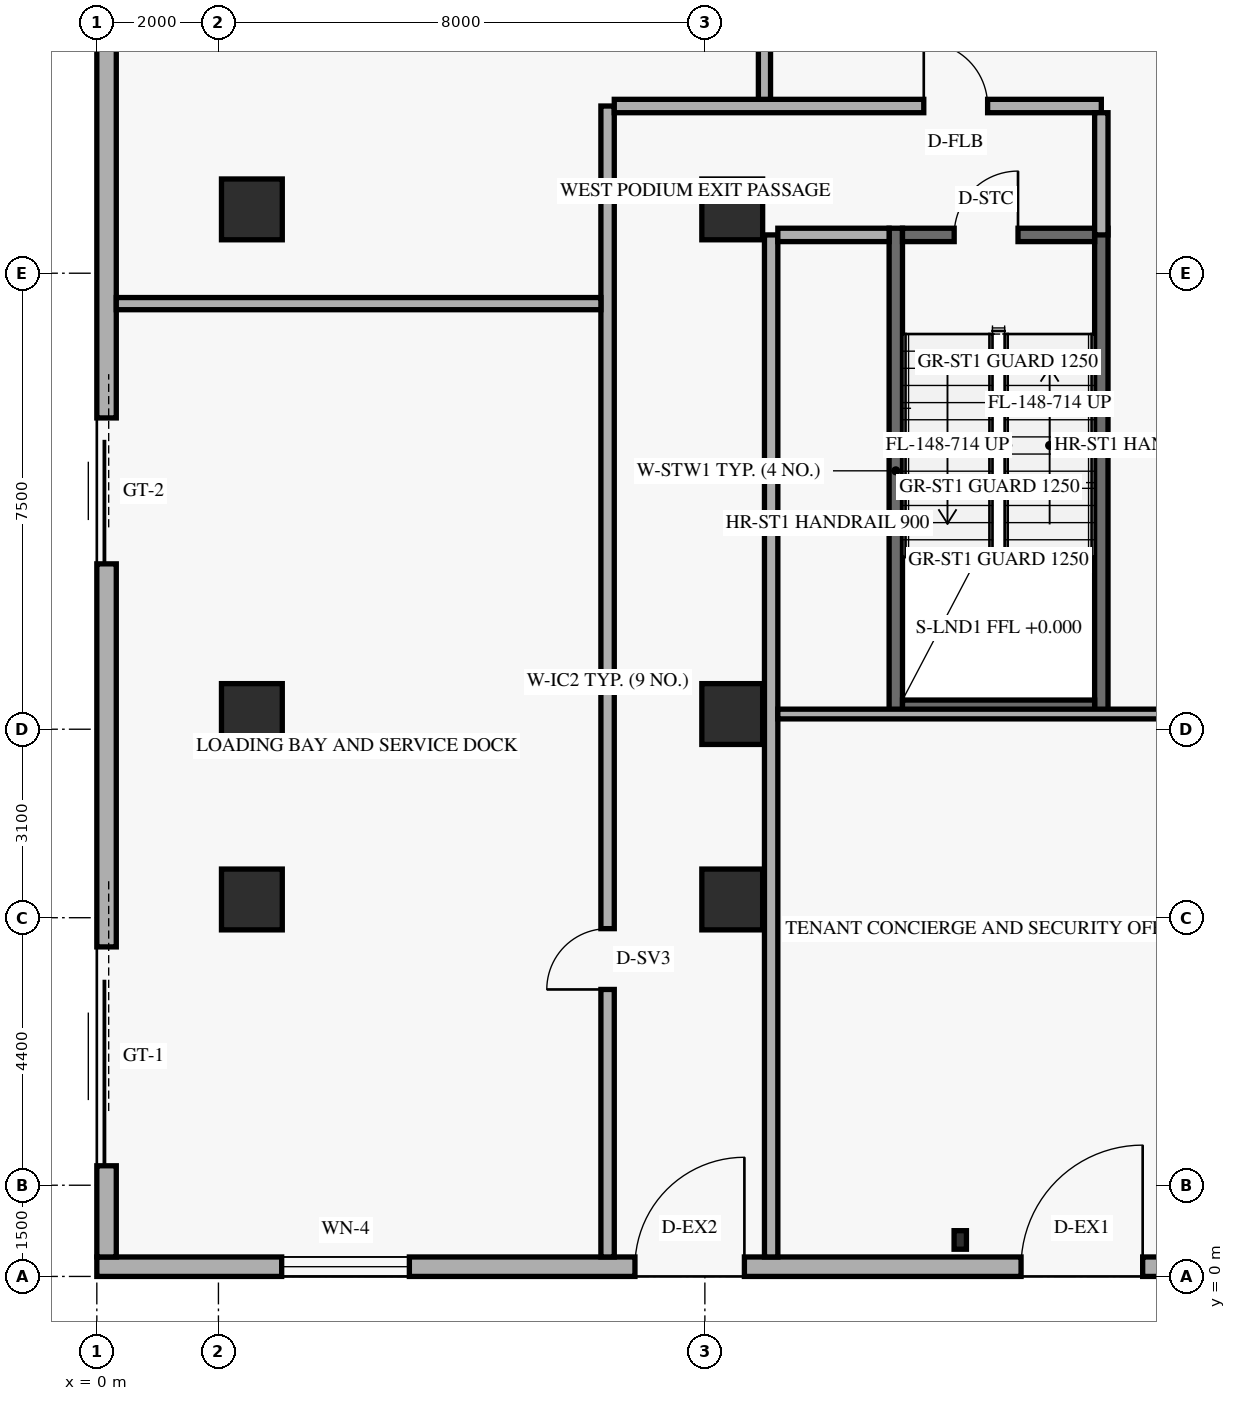
"""IFC4 building model, lengths in metres.
Left out: names, types, materials, properties, quantities, classifications, styles, units other than length and angle.
Written with IfcOpenShell. Run it as: python <this file> out.ifc"""

import sys

from ifc_helpers import new_model, si_unit, direction, frame, frame_2d, origin, origin_2d, place, context, subcontext, project, spatial, rectangle, hollow_rectangle, extrude, element, fill, save


model = new_model("IFC4")
c1 = context("Model", 3, precision=1e-05, world=origin(), true_north=direction((0.0, 1.0)))
c2 = subcontext(c1, "Body", "Model", "MODEL_VIEW")
j1 = project(units=[si_unit("LENGTHUNIT", "METRE"), si_unit("PLANEANGLEUNIT", "RADIAN")], contexts=[c1])
p1 = place(None, origin())
s1 = spatial("IfcSite", under=j1, at=p1, CompositionType="ELEMENT")
p2 = place(p1, origin())
s2 = spatial("IfcBuilding", under=s1, at=p2, CompositionType="ELEMENT")
p3 = place(p2, origin())
s3 = spatial("IfcBuildingStorey", under=s2, at=p3, CompositionType="ELEMENT", Elevation=0.0)
for number, where, z_axis, x_axis in (
    (1, (13.14, 9.26, 0.0), (0.0, 0.0, 1.0), (0.0, 1.0, 0.0)),
    (2, (16.52, 9.26, 0.0), (0.0, 0.0, 1.0), (0.0, 1.0, 0.0)),
):
    element("IfcWall", number, at=place(p3, frame(where, z_axis=z_axis, x_axis=x_axis)), inside=s3, PredefinedType="SHEAR", context=c2, shape_type="SweptSolid", body=[
        extrude(rectangle(XDim=7.98, YDim=0.22, at=frame_2d((3.99, 0.0))), origin(), (0.0, 0.0, 1.0), 4.39),
    ])
p4 = place(p3, frame((13.25, 9.37, 0.0), z_axis=(0.0, 0.0, 1.0), x_axis=(1.0, 0.0, 0.0)))
e3 = element("IfcWall", 3, at=p4, inside=s3, PredefinedType="SHEAR", context=c2, shape_type="SweptSolid", body=[
    extrude(rectangle(XDim=3.16, YDim=0.22, at=frame_2d((1.58, 0.0))), origin(), (0.0, 0.0, 1.0), 4.39),
])
p5 = place(p3, frame((13.25, 17.13, 0.0), z_axis=(0.0, 0.0, 1.0), x_axis=(1.0, 0.0, 0.0)))
e4 = element("IfcWall", 4, at=p5, inside=s3, PredefinedType="SHEAR", context=c2, shape_type="SweptSolid", body=[
    extrude(rectangle(XDim=3.16, YDim=0.22, at=frame_2d((1.58, 0.0))), origin(), (0.0, 0.0, 1.0), 4.39),
])
p6 = place(p5, frame((0.85, 0.0, 0.0)))
e5 = element("IfcOpeningElement", 5, at=p6, cuts=e4, PredefinedType="OPENING", context=c2, shape_type="SweptSolid", body=[
    extrude(rectangle(XDim=1.05, YDim=2.15, at=frame_2d((0.525, 1.075))), frame((0.0, 0.12, 0.0), z_axis=(0.0, -1.0, 0.0), x_axis=(1.0, 0.0, 0.0)), (0.0, 0.0, 1.0), 0.24),
])
for number, where, z_axis, x_axis in (
    (6, (2.55, 6.2, 0.0), (0.0, 0.0, 1.0), (1.0, 0.0, 0.0)),
    (7, (2.55, 9.25, 0.0), (0.0, 0.0, 1.0), (1.0, 0.0, 0.0)),
    (8, (2.55, 17.55, 0.0), (0.0, 0.0, 1.0), (1.0, 0.0, 0.0)),
    (9, (10.45, 6.2, 0.0), (0.0, 0.0, 1.0), (1.0, 0.0, 0.0)),
    (10, (10.45, 9.25, 0.0), (0.0, 0.0, 1.0), (1.0, 0.0, 0.0)),
    (11, (10.45, 17.55, 0.0), (0.0, 0.0, 1.0), (1.0, 0.0, 0.0)),
):
    element("IfcColumn", number, at=place(p3, frame(where, z_axis=z_axis, x_axis=x_axis)), inside=s3, PredefinedType="COLUMN", context=c2, shape_type="SweptSolid", body=[
        extrude(rectangle(XDim=1.0, YDim=1.0, at=origin_2d()), origin(), (0.0, 0.0, 1.0), 4.8),
    ])
p7 = place(p3, frame((14.2, 0.6, 0.0), z_axis=(0.0, 0.0, 1.0), x_axis=(1.0, 0.0, 0.0)))
e12 = element("IfcColumn", 12, at=p7, inside=s3, PredefinedType="PILASTER", context=c2, shape_type="SweptSolid", body=[
    extrude(hollow_rectangle(XDim=0.203, YDim=0.305, WallThickness=0.013, at=origin_2d()), origin(), (0.0, 0.0, 1.0), 4.39),
])
p8 = place(p3, frame((0.0, 0.16, 0.0), z_axis=(0.0, 0.0, 1.0), x_axis=(1.0, 0.0, 0.0)))
e13 = element("IfcWall", 13, at=p8, inside=s3, PredefinedType="SOLIDWALL", context=c2, shape_type="SweptSolid", body=[
    extrude(rectangle(XDim=56.0, YDim=0.32, at=frame_2d((28.0, 0.0))), origin(), (0.0, 0.0, 1.0), 4.39),
])
p9 = place(p8, frame((8.85, 0.0, 0.0)))
e14 = element("IfcOpeningElement", 14, at=p9, cuts=e13, PredefinedType="OPENING", context=c2, shape_type="SweptSolid", body=[
    extrude(rectangle(XDim=1.8, YDim=2.25, at=frame_2d((0.9, 1.125))), frame((0.0, 0.17, 0.0), z_axis=(0.0, -1.0, 0.0), x_axis=(1.0, 0.0, 0.0)), (0.0, 0.0, 1.0), 0.34),
])
p10 = place(p8, frame((15.2, 0.0, 0.0)))
e15 = element("IfcOpeningElement", 15, at=p10, cuts=e13, PredefinedType="OPENING", context=c2, shape_type="SweptSolid", body=[
    extrude(rectangle(XDim=2.0, YDim=2.35, at=frame_2d((1.0, 1.175))), frame((0.0, 0.17, 0.0), z_axis=(0.0, -1.0, 0.0), x_axis=(1.0, 0.0, 0.0)), (0.0, 0.0, 1.0), 0.34),
])
p11 = place(p8, frame((29.6, 0.0, 0.0)))
e16 = element("IfcOpeningElement", 16, at=p11, cuts=e13, PredefinedType="OPENING", context=c2, shape_type="SweptSolid", body=[
    extrude(rectangle(XDim=1.8, YDim=2.25, at=frame_2d((0.9, 1.125))), frame((0.0, 0.17, 0.0), z_axis=(0.0, -1.0, 0.0), x_axis=(1.0, 0.0, 0.0)), (0.0, 0.0, 1.0), 0.34),
])
p12 = place(p8, frame((3.04, 0.0, 0.85)))
e17 = element("IfcOpeningElement", 17, at=p12, cuts=e13, PredefinedType="OPENING", context=c2, shape_type="SweptSolid", body=[
    extrude(rectangle(XDim=2.1, YDim=1.75, at=frame_2d((1.05, 0.875))), frame((0.0, 0.17, 0.0), z_axis=(0.0, -1.0, 0.0), x_axis=(1.0, 0.0, 0.0)), (0.0, 0.0, 1.0), 0.34),
])
p13 = place(p8, frame((18.56, 0.0, 0.85)))
e18 = element("IfcOpeningElement", 18, at=p13, cuts=e13, PredefinedType="OPENING", context=c2, shape_type="SweptSolid", body=[
    extrude(rectangle(XDim=2.1, YDim=1.75, at=frame_2d((1.05, 0.875))), frame((0.0, 0.17, 0.0), z_axis=(0.0, -1.0, 0.0), x_axis=(1.0, 0.0, 0.0)), (0.0, 0.0, 1.0), 0.34),
])
p14 = place(p8, frame((23.745, 0.0, 0.85)))
e19 = element("IfcOpeningElement", 19, at=p14, cuts=e13, PredefinedType="OPENING", context=c2, shape_type="SweptSolid", body=[
    extrude(rectangle(XDim=2.1, YDim=1.75, at=frame_2d((1.05, 0.875))), frame((0.0, 0.17, 0.0), z_axis=(0.0, -1.0, 0.0), x_axis=(1.0, 0.0, 0.0)), (0.0, 0.0, 1.0), 0.34),
])
p15 = place(p8, frame((37.275, 0.0, 0.85)))
e20 = element("IfcOpeningElement", 20, at=p15, cuts=e13, PredefinedType="OPENING", context=c2, shape_type="SweptSolid", body=[
    extrude(rectangle(XDim=2.1, YDim=1.75, at=frame_2d((1.05, 0.875))), frame((0.0, 0.17, 0.0), z_axis=(0.0, -1.0, 0.0), x_axis=(1.0, 0.0, 0.0)), (0.0, 0.0, 1.0), 0.34),
])
p16 = place(p8, frame((48.95, 0.0, 0.85)))
e21 = element("IfcOpeningElement", 21, at=p16, cuts=e13, PredefinedType="OPENING", context=c2, shape_type="SweptSolid", body=[
    extrude(rectangle(XDim=2.1, YDim=1.75, at=frame_2d((1.05, 0.875))), frame((0.0, 0.17, 0.0), z_axis=(0.0, -1.0, 0.0), x_axis=(1.0, 0.0, 0.0)), (0.0, 0.0, 1.0), 0.34),
])
p17 = place(p3, frame((0.16, 0.32, 0.0), z_axis=(0.0, 0.0, 1.0), x_axis=(0.0, 1.0, 0.0)))
e22 = element("IfcWall", 22, at=p17, inside=s3, PredefinedType="SOLIDWALL", context=c2, shape_type="SweptSolid", body=[
    extrude(rectangle(XDim=55.16, YDim=0.32, at=frame_2d((27.58, 0.0))), origin(), (0.0, 0.0, 1.0), 4.39),
])
p18 = place(p17, frame((1.5, 0.0, 0.0)))
e23 = element("IfcOpeningElement", 23, at=p18, cuts=e22, PredefinedType="OPENING", context=c2, shape_type="SweptSolid", body=[
    extrude(rectangle(XDim=3.6, YDim=3.5, at=frame_2d((1.8, 1.75))), frame((0.0, 0.17, 0.0), z_axis=(0.0, -1.0, 0.0), x_axis=(1.0, 0.0, 0.0)), (0.0, 0.0, 1.0), 0.34),
])
p19 = place(p17, frame((11.4, 0.0, 0.0)))
e24 = element("IfcOpeningElement", 24, at=p19, cuts=e22, PredefinedType="OPENING", context=c2, shape_type="SweptSolid", body=[
    extrude(rectangle(XDim=2.4, YDim=2.55, at=frame_2d((1.2, 1.275))), frame((0.0, 0.17, 0.0), z_axis=(0.0, -1.0, 0.0), x_axis=(1.0, 0.0, 0.0)), (0.0, 0.0, 1.0), 0.34),
])
p20 = place(p17, frame((28.5, 0.0, 0.0)))
e25 = element("IfcOpeningElement", 25, at=p20, cuts=e22, PredefinedType="OPENING", context=c2, shape_type="SweptSolid", body=[
    extrude(rectangle(XDim=2.4, YDim=2.55, at=frame_2d((1.2, 1.275))), frame((0.0, 0.17, 0.0), z_axis=(0.0, -1.0, 0.0), x_axis=(1.0, 0.0, 0.0)), (0.0, 0.0, 1.0), 0.34),
])
p21 = place(p17, frame((34.2, 0.0, 0.0)))
e26 = element("IfcOpeningElement", 26, at=p21, cuts=e22, PredefinedType="OPENING", context=c2, shape_type="SweptSolid", body=[
    extrude(rectangle(XDim=2.4, YDim=2.55, at=frame_2d((1.2, 1.275))), frame((0.0, 0.17, 0.0), z_axis=(0.0, -1.0, 0.0), x_axis=(1.0, 0.0, 0.0)), (0.0, 0.0, 1.0), 0.34),
])
p22 = place(p17, frame((20.105, 0.0, 0.85)))
e27 = element("IfcOpeningElement", 27, at=p22, cuts=e22, PredefinedType="OPENING", context=c2, shape_type="SweptSolid", body=[
    extrude(rectangle(XDim=1.95, YDim=1.75, at=frame_2d((0.975, 0.875))), frame((0.0, 0.17, 0.0), z_axis=(0.0, -1.0, 0.0), x_axis=(1.0, 0.0, 0.0)), (0.0, 0.0, 1.0), 0.34),
])
p23 = place(p17, frame((39.275, 0.0, 0.85)))
e28 = element("IfcOpeningElement", 28, at=p23, cuts=e22, PredefinedType="OPENING", context=c2, shape_type="SweptSolid", body=[
    extrude(rectangle(XDim=1.95, YDim=1.75, at=frame_2d((0.975, 0.875))), frame((0.0, 0.17, 0.0), z_axis=(0.0, -1.0, 0.0), x_axis=(1.0, 0.0, 0.0)), (0.0, 0.0, 1.0), 0.34),
])
p24 = place(p17, frame((47.945, 0.0, 0.85)))
e29 = element("IfcOpeningElement", 29, at=p24, cuts=e22, PredefinedType="OPENING", context=c2, shape_type="SweptSolid", body=[
    extrude(rectangle(XDim=1.95, YDim=1.75, at=frame_2d((0.975, 0.875))), frame((0.0, 0.17, 0.0), z_axis=(0.0, -1.0, 0.0), x_axis=(1.0, 0.0, 0.0)), (0.0, 0.0, 1.0), 0.34),
])
p25 = place(p3, frame((8.4, 0.32, 0.0), z_axis=(0.0, 0.0, 1.0), x_axis=(0.0, 1.0, 0.0)))
e30 = element("IfcWall", 30, at=p25, inside=s3, PredefinedType="STANDARD", context=c2, shape_type="SweptSolid", body=[
    extrude(rectangle(XDim=18.93, YDim=0.22, at=frame_2d((9.465, 0.0))), origin(), (0.0, 0.0, 1.0), 3.272),
])
p26 = place(p25, frame((4.4, 0.0, 0.0)))
e31 = element("IfcOpeningElement", 31, at=p26, cuts=e30, PredefinedType="OPENING", context=c2, shape_type="SweptSolid", body=[
    extrude(rectangle(XDim=1.0, YDim=2.15, at=frame_2d((0.5, 1.075))), frame((0.0, 0.12, 0.0), z_axis=(0.0, -1.0, 0.0), x_axis=(1.0, 0.0, 0.0)), (0.0, 0.0, 1.0), 0.24),
])
p27 = place(p3, frame((11.09, 0.32, 0.0), z_axis=(0.0, 0.0, 1.0), x_axis=(0.0, 1.0, 0.0)))
e32 = element("IfcWall", 32, at=p27, inside=s3, PredefinedType="STANDARD", context=c2, shape_type="SweptSolid", body=[
    extrude(rectangle(XDim=16.81, YDim=0.22, at=frame_2d((8.405, 0.0))), origin(), (0.0, 0.0, 1.0), 3.761),
])
p28 = place(p3, frame((11.2, 17.13, 0.0), z_axis=(0.0, 0.0, 1.0), x_axis=(1.0, 0.0, 0.0)))
e33 = element("IfcWall", 33, at=p28, inside=s3, PredefinedType="STANDARD", context=c2, shape_type="SweptSolid", body=[
    extrude(rectangle(XDim=1.83, YDim=0.22, at=frame_2d((0.915, 0.0))), origin(), (0.0, 0.0, 1.0), 4.39),
])
p29 = place(p3, frame((8.51, 19.25, 0.0), z_axis=(0.0, 0.0, 1.0), x_axis=(1.0, 0.0, 0.0)))
e34 = element("IfcWall", 34, at=p29, inside=s3, PredefinedType="STANDARD", context=c2, shape_type="SweptSolid", body=[
    extrude(rectangle(XDim=8.01, YDim=0.22, at=frame_2d((4.005, 0.0))), origin(), (0.0, 0.0, 1.0), 3.521),
])
p30 = place(p29, frame((5.09, 0.0, 0.0)))
e35 = element("IfcOpeningElement", 35, at=p30, cuts=e34, PredefinedType="OPENING", context=c2, shape_type="SweptSolid", body=[
    extrude(rectangle(XDim=1.05, YDim=2.15, at=frame_2d((0.525, 1.075))), frame((0.0, 0.12, 0.0), z_axis=(0.0, -1.0, 0.0), x_axis=(1.0, 0.0, 0.0)), (0.0, 0.0, 1.0), 0.24),
])
p31 = place(p3, frame((16.52, 17.13, 0.0), z_axis=(0.0, 0.0, 1.0), x_axis=(0.0, 1.0, 0.0)))
e36 = element("IfcWall", 36, at=p31, inside=s3, PredefinedType="STANDARD", context=c2, shape_type="SweptSolid", body=[
    extrude(rectangle(XDim=2.01, YDim=0.22, at=frame_2d((1.005, 0.0))), origin(), (0.0, 0.0, 1.0), 3.272),
])
p32 = place(p3, frame((10.98, 19.36, 0.0), z_axis=(0.0, 0.0, 1.0), x_axis=(0.0, 1.0, 0.0)))
e37 = element("IfcWall", 37, at=p32, inside=s3, PredefinedType="STANDARD", context=c2, shape_type="SweptSolid", body=[
    extrude(rectangle(XDim=36.12, YDim=0.2, at=frame_2d((18.06, 0.0))), origin(), (0.0, 0.0, 1.0), 3.272),
])
p33 = place(p32, frame((3.09, 0.0, 0.0)))
e38 = element("IfcOpeningElement", 38, at=p33, cuts=e37, PredefinedType="OPENING", context=c2, shape_type="SweptSolid", body=[
    extrude(rectangle(XDim=0.95, YDim=2.15, at=frame_2d((0.475, 1.075))), frame((0.0, 0.11, 0.0), z_axis=(0.0, -1.0, 0.0), x_axis=(1.0, 0.0, 0.0)), (0.0, 0.0, 1.0), 0.22),
])
p34 = place(p32, frame((13.39, 0.0, 0.0)))
e39 = element("IfcOpeningElement", 39, at=p34, cuts=e37, PredefinedType="OPENING", context=c2, shape_type="SweptSolid", body=[
    extrude(rectangle(XDim=0.95, YDim=2.15, at=frame_2d((0.475, 1.075))), frame((0.0, 0.11, 0.0), z_axis=(0.0, -1.0, 0.0), x_axis=(1.0, 0.0, 0.0)), (0.0, 0.0, 1.0), 0.22),
])
p35 = place(p32, frame((27.39, 0.0, 0.0)))
e40 = element("IfcOpeningElement", 40, at=p35, cuts=e37, PredefinedType="OPENING", context=c2, shape_type="SweptSolid", body=[
    extrude(rectangle(XDim=0.95, YDim=2.15, at=frame_2d((0.475, 1.075))), frame((0.0, 0.11, 0.0), z_axis=(0.0, -1.0, 0.0), x_axis=(1.0, 0.0, 0.0)), (0.0, 0.0, 1.0), 0.22),
])
p36 = place(p3, frame((0.32, 16.0, 0.0), z_axis=(0.0, 0.0, 1.0), x_axis=(1.0, 0.0, 0.0)))
e41 = element("IfcWall", 41, at=p36, inside=s3, PredefinedType="STANDARD", context=c2, shape_type="SweptSolid", body=[
    extrude(rectangle(XDim=7.97, YDim=0.2, at=frame_2d((3.985, 0.0))), origin(), (0.0, 0.0, 1.0), 3.761),
])
p37 = place(p3, frame((11.2, 9.25, 0.0), z_axis=(0.0, 0.0, 1.0), x_axis=(1.0, 0.0, 0.0)))
e42 = element("IfcWall", 42, at=p37, inside=s3, PredefinedType="PARTITIONING", context=c2, shape_type="SweptSolid", body=[
    extrude(rectangle(XDim=12.8, YDim=0.16, at=frame_2d((6.4, 0.0))), origin(), (0.0, 0.0, 1.0), 3.272),
])
p38 = place(p37, frame((7.77, 0.0, 0.0)))
e43 = element("IfcOpeningElement", 43, at=p38, cuts=e42, PredefinedType="OPENING", context=c2, shape_type="SweptSolid", body=[
    extrude(rectangle(XDim=1.15, YDim=2.15, at=frame_2d((0.575, 1.075))), frame((0.0, 0.09, 0.0), z_axis=(0.0, -1.0, 0.0), x_axis=(1.0, 0.0, 0.0)), (0.0, 0.0, 1.0), 0.18),
])
p39 = place(p9, frame((1.8, 0.0, 0.0), z_axis=(0.0, 0.0, 1.0), x_axis=(-1.0, 0.0, 0.0)))
e44 = element("IfcDoor", 44, at=p39, inside=s3, OperationType="SINGLE_SWING_LEFT", PredefinedType="DOOR", context=c2, shape_type="SweptSolid", body=[
    extrude(rectangle(XDim=1.8, YDim=2.25, at=frame_2d((0.9, 1.125))), frame((0.0, 0.025, 0.0), z_axis=(0.0, -1.0, 0.0), x_axis=(1.0, 0.0, 0.0)), (0.0, 0.0, 1.0), 0.05),
])
fill(e14, e44)
p40 = place(p10, frame((2.0, 0.0, 0.0), z_axis=(0.0, 0.0, 1.0), x_axis=(-1.0, 0.0, 0.0)))
e45 = element("IfcDoor", 45, at=p40, inside=s3, OperationType="SINGLE_SWING_LEFT", PredefinedType="DOOR", context=c2, shape_type="SweptSolid", body=[
    extrude(rectangle(XDim=2.0, YDim=2.35, at=frame_2d((1.0, 1.175))), frame((0.0, 0.025, 0.0), z_axis=(0.0, -1.0, 0.0), x_axis=(1.0, 0.0, 0.0)), (0.0, 0.0, 1.0), 0.05),
])
fill(e15, e45)
p41 = place(p12, origin())
e46 = element("IfcWindow", 46, at=p41, inside=s3, PartitioningType="SINGLE_PANEL", PredefinedType="WINDOW", context=c2, shape_type="SweptSolid", body=[
    extrude(rectangle(XDim=2.1, YDim=1.75, at=frame_2d((1.05, 0.875))), frame((0.0, 0.03, 0.0), z_axis=(0.0, -1.0, 0.0), x_axis=(1.0, 0.0, 0.0)), (0.0, 0.0, 1.0), 0.06),
])
fill(e17, e46)
p42 = place(p18, origin())
e47 = element("IfcDoor", 47, at=p42, inside=s3, OperationType="SLIDING_TO_LEFT", PredefinedType="GATE", context=c2, shape_type="SweptSolid", body=[
    extrude(rectangle(XDim=3.6, YDim=3.5, at=frame_2d((1.8, 1.75))), frame((0.0, 0.025, 0.0), z_axis=(0.0, -1.0, 0.0), x_axis=(1.0, 0.0, 0.0)), (0.0, 0.0, 1.0), 0.05),
])
fill(e23, e47)
p43 = place(p19, origin())
e48 = element("IfcDoor", 48, at=p43, inside=s3, OperationType="SLIDING_TO_RIGHT", PredefinedType="GATE", context=c2, shape_type="SweptSolid", body=[
    extrude(rectangle(XDim=2.4, YDim=2.55, at=frame_2d((1.2, 1.275))), frame((0.0, 0.025, 0.0), z_axis=(0.0, -1.0, 0.0), x_axis=(1.0, 0.0, 0.0)), (0.0, 0.0, 1.0), 0.05),
])
fill(e24, e48)
p44 = place(p6, frame((1.05, 0.0, 0.0), z_axis=(0.0, 0.0, 1.0), x_axis=(-1.0, 0.0, 0.0)))
e49 = element("IfcDoor", 49, at=p44, inside=s3, OperationType="SINGLE_SWING_LEFT", PredefinedType="DOOR", context=c2, shape_type="SweptSolid", body=[
    extrude(rectangle(XDim=1.05, YDim=2.15, at=frame_2d((0.525, 1.075))), frame((0.0, 0.025, 0.0), z_axis=(0.0, -1.0, 0.0), x_axis=(1.0, 0.0, 0.0)), (0.0, 0.0, 1.0), 0.05),
])
fill(e5, e49)
p45 = place(p30, origin())
e50 = element("IfcDoor", 50, at=p45, inside=s3, OperationType="SINGLE_SWING_LEFT", PredefinedType="DOOR", context=c2, shape_type="SweptSolid", body=[
    extrude(rectangle(XDim=1.05, YDim=2.15, at=frame_2d((0.525, 1.075))), frame((0.0, 0.025, 0.0), z_axis=(0.0, -1.0, 0.0), x_axis=(1.0, 0.0, 0.0)), (0.0, 0.0, 1.0), 0.05),
])
fill(e35, e50)
p46 = place(p26, origin())
e51 = element("IfcDoor", 51, at=p46, inside=s3, OperationType="SINGLE_SWING_LEFT", PredefinedType="DOOR", context=c2, shape_type="SweptSolid", body=[
    extrude(rectangle(XDim=1.0, YDim=2.15, at=frame_2d((0.5, 1.075))), frame((0.0, 0.025, 0.0), z_axis=(0.0, -1.0, 0.0), x_axis=(1.0, 0.0, 0.0)), (0.0, 0.0, 1.0), 0.05),
])
fill(e31, e51)
save(model, sys.argv[1])
